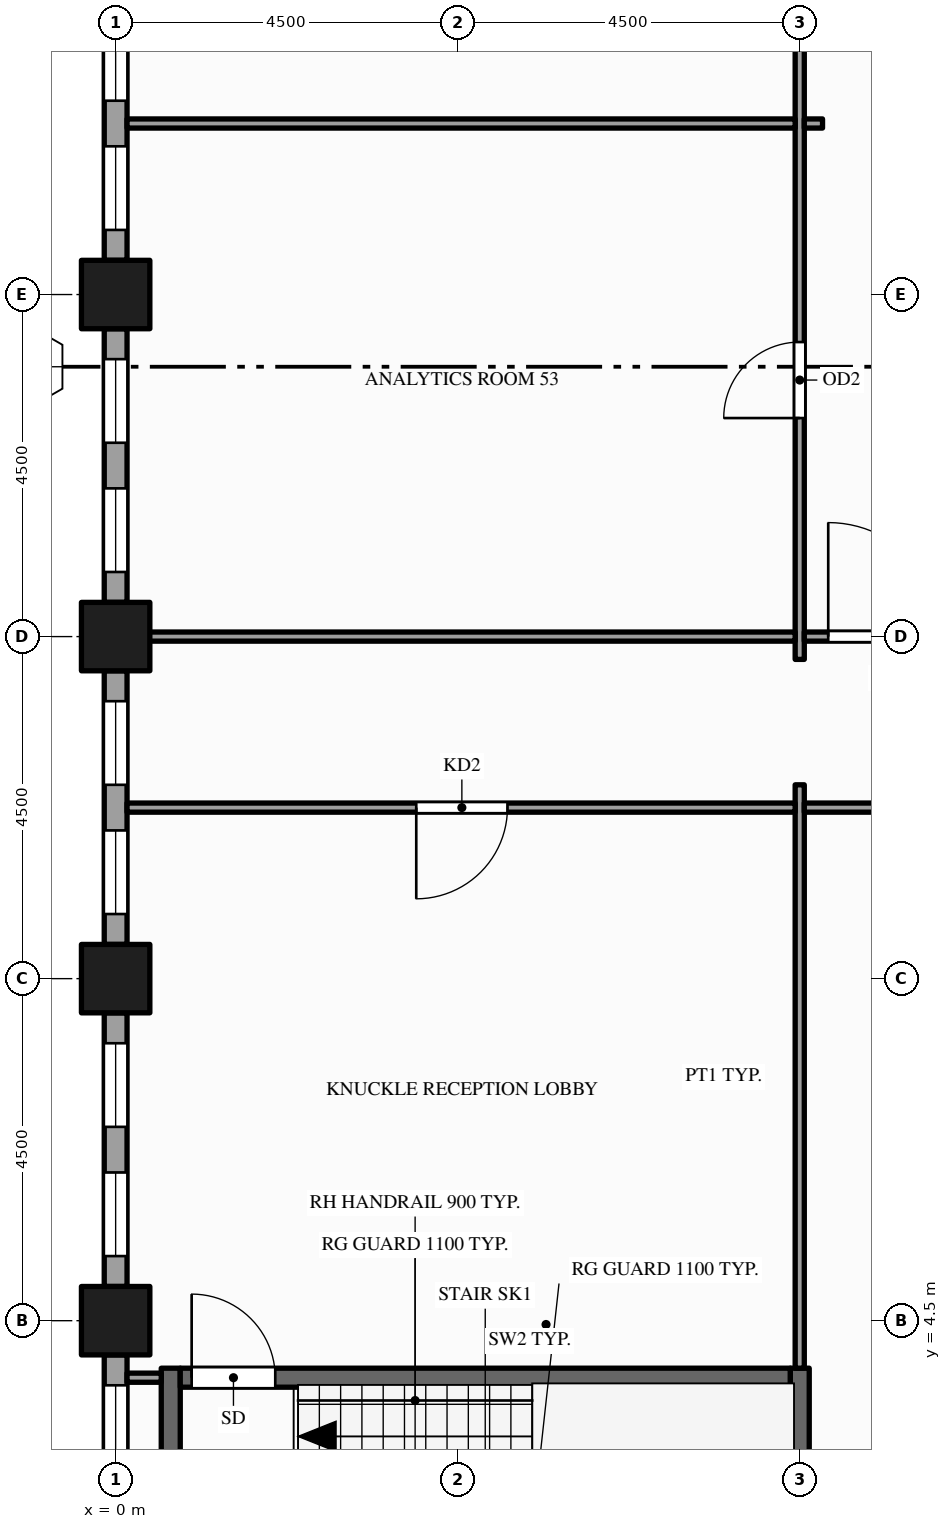
"""IFC4 building model, lengths in metres.
Left out: names, types, materials, properties, quantities, classifications, styles, units other than length and angle.
Written with IfcOpenShell. Run it as: python <this file> out.ifc"""

import sys

from ifc_helpers import new_model, si_unit, direction, frame, frame_2d, origin, origin_2d, place, context, subcontext, project, spatial, rectangle, hollow_rectangle, extrude, element, fill, save


model = new_model("IFC4")
c1 = context("Model", 3, precision=1e-05, world=origin(), true_north=direction((0.0, 1.0)))
c2 = subcontext(c1, "Body", "Model", "MODEL_VIEW")
j1 = project(units=[si_unit("LENGTHUNIT", "METRE"), si_unit("PLANEANGLEUNIT", "RADIAN")], contexts=[c1])
p1 = place(None, origin())
s1 = spatial("IfcSite", under=j1, at=p1, CompositionType="ELEMENT")
p2 = place(p1, origin())
s2 = spatial("IfcBuilding", under=s1, at=p2, CompositionType="ELEMENT")
p3 = place(p2, frame((0.0, 0.0, 155.0)))
s3 = spatial("IfcBuildingStorey", under=s2, at=p3, CompositionType="ELEMENT", Elevation=155.0)
for number, where, z_axis, x_axis in (
    (1, (0.0, 4.5, -0.15), (0.0, 0.0, 1.0), (1.0, 0.0, 0.0)),
    (2, (0.0, 9.0, -0.15), (0.0, 0.0, 1.0), (1.0, 0.0, 0.0)),
    (3, (0.0, 13.5, -0.15), (0.0, 0.0, 1.0), (1.0, 0.0, 0.0)),
    (4, (0.0, 18.0, -0.15), (0.0, 0.0, 1.0), (1.0, 0.0, 0.0)),
):
    element("IfcColumn", number, at=place(p3, frame(where, z_axis=z_axis, x_axis=x_axis)), inside=s3, PredefinedType="COLUMN", context=c2, shape_type="SweptSolid", body=[
        extrude(hollow_rectangle(XDim=0.9, YDim=0.9, WallThickness=0.045, at=origin_2d()), origin(), (0.0, 0.0, 1.0), 4.0),
    ])
p4 = place(p3, frame((0.0, 22.05, 0.0), z_axis=(0.0, 0.0, 1.0), x_axis=(0.0, -1.0, 0.0)))
e5 = element("IfcWall", 5, at=p4, inside=s3, PredefinedType="STANDARD", context=c2, shape_type="SweptSolid", body=[
    extrude(rectangle(XDim=3.6, YDim=0.3, at=frame_2d((1.8, 0.0))), origin(), (0.0, 0.0, 1.0), 3.149),
])
p5 = place(p4, frame((0.4, 0.0, 0.9)))
e6 = element("IfcOpeningElement", 6, at=p5, cuts=e5, PredefinedType="OPENING", context=c2, shape_type="SweptSolid", body=[
    extrude(rectangle(XDim=1.1, YDim=2.0, at=frame_2d((0.55, 1.0))), frame((0.0, 0.16, 0.0), z_axis=(0.0, -1.0, 0.0), x_axis=(1.0, 0.0, 0.0)), (0.0, 0.0, 1.0), 0.32),
])
p6 = place(p4, frame((2.1, 0.0, 0.9)))
e7 = element("IfcOpeningElement", 7, at=p6, cuts=e5, PredefinedType="OPENING", context=c2, shape_type="SweptSolid", body=[
    extrude(rectangle(XDim=1.1, YDim=2.0, at=frame_2d((0.55, 1.0))), frame((0.0, 0.16, 0.0), z_axis=(0.0, -1.0, 0.0), x_axis=(1.0, 0.0, 0.0)), (0.0, 0.0, 1.0), 0.32),
])
p7 = place(p3, frame((0.0, 17.55, 0.0), z_axis=(0.0, 0.0, 1.0), x_axis=(0.0, -1.0, 0.0)))
e8 = element("IfcWall", 8, at=p7, inside=s3, PredefinedType="STANDARD", context=c2, shape_type="SweptSolid", body=[
    extrude(rectangle(XDim=3.6, YDim=0.3, at=frame_2d((1.8, 0.0))), origin(), (0.0, 0.0, 1.0), 3.149),
])
p8 = place(p7, frame((0.4, 0.0, 0.9)))
e9 = element("IfcOpeningElement", 9, at=p8, cuts=e8, PredefinedType="OPENING", context=c2, shape_type="SweptSolid", body=[
    extrude(rectangle(XDim=1.1, YDim=2.0, at=frame_2d((0.55, 1.0))), frame((0.0, 0.16, 0.0), z_axis=(0.0, -1.0, 0.0), x_axis=(1.0, 0.0, 0.0)), (0.0, 0.0, 1.0), 0.32),
])
p9 = place(p7, frame((2.1, 0.0, 0.9)))
e10 = element("IfcOpeningElement", 10, at=p9, cuts=e8, PredefinedType="OPENING", context=c2, shape_type="SweptSolid", body=[
    extrude(rectangle(XDim=1.1, YDim=2.0, at=frame_2d((0.55, 1.0))), frame((0.0, 0.16, 0.0), z_axis=(0.0, -1.0, 0.0), x_axis=(1.0, 0.0, 0.0)), (0.0, 0.0, 1.0), 0.32),
])
p10 = place(p3, frame((0.0, 13.05, 0.0), z_axis=(0.0, 0.0, 1.0), x_axis=(0.0, -1.0, 0.0)))
e11 = element("IfcWall", 11, at=p10, inside=s3, PredefinedType="STANDARD", context=c2, shape_type="SweptSolid", body=[
    extrude(rectangle(XDim=3.6, YDim=0.3, at=frame_2d((1.8, 0.0))), origin(), (0.0, 0.0, 1.0), 3.149),
])
p11 = place(p10, frame((0.4, 0.0, 0.9)))
e12 = element("IfcOpeningElement", 12, at=p11, cuts=e11, PredefinedType="OPENING", context=c2, shape_type="SweptSolid", body=[
    extrude(rectangle(XDim=1.1, YDim=2.0, at=frame_2d((0.55, 1.0))), frame((0.0, 0.16, 0.0), z_axis=(0.0, -1.0, 0.0), x_axis=(1.0, 0.0, 0.0)), (0.0, 0.0, 1.0), 0.32),
])
p12 = place(p10, frame((2.1, 0.0, 0.9)))
e13 = element("IfcOpeningElement", 13, at=p12, cuts=e11, PredefinedType="OPENING", context=c2, shape_type="SweptSolid", body=[
    extrude(rectangle(XDim=1.1, YDim=2.0, at=frame_2d((0.55, 1.0))), frame((0.0, 0.16, 0.0), z_axis=(0.0, -1.0, 0.0), x_axis=(1.0, 0.0, 0.0)), (0.0, 0.0, 1.0), 0.32),
])
p13 = place(p3, frame((0.0, 8.55, 0.0), z_axis=(0.0, 0.0, 1.0), x_axis=(0.0, -1.0, 0.0)))
e14 = element("IfcWall", 14, at=p13, inside=s3, PredefinedType="STANDARD", context=c2, shape_type="SweptSolid", body=[
    extrude(rectangle(XDim=3.6, YDim=0.3, at=frame_2d((1.8, 0.0))), origin(), (0.0, 0.0, 1.0), 3.149),
])
p14 = place(p13, frame((0.4, 0.0, 0.9)))
e15 = element("IfcOpeningElement", 15, at=p14, cuts=e14, PredefinedType="OPENING", context=c2, shape_type="SweptSolid", body=[
    extrude(rectangle(XDim=1.1, YDim=2.0, at=frame_2d((0.55, 1.0))), frame((0.0, 0.16, 0.0), z_axis=(0.0, -1.0, 0.0), x_axis=(1.0, 0.0, 0.0)), (0.0, 0.0, 1.0), 0.32),
])
p15 = place(p13, frame((2.1, 0.0, 0.9)))
e16 = element("IfcOpeningElement", 16, at=p15, cuts=e14, PredefinedType="OPENING", context=c2, shape_type="SweptSolid", body=[
    extrude(rectangle(XDim=1.1, YDim=2.0, at=frame_2d((0.55, 1.0))), frame((0.0, 0.16, 0.0), z_axis=(0.0, -1.0, 0.0), x_axis=(1.0, 0.0, 0.0)), (0.0, 0.0, 1.0), 0.32),
])
p16 = place(p3, frame((0.0, 4.05, 0.0), z_axis=(0.0, 0.0, 1.0), x_axis=(0.0, -1.0, 0.0)))
e17 = element("IfcWall", 17, at=p16, inside=s3, PredefinedType="STANDARD", context=c2, shape_type="SweptSolid", body=[
    extrude(rectangle(XDim=3.6, YDim=0.3, at=frame_2d((1.8, 0.0))), origin(), (0.0, 0.0, 1.0), 3.149),
])
p17 = place(p16, frame((0.4, 0.0, 0.9)))
e18 = element("IfcOpeningElement", 18, at=p17, cuts=e17, PredefinedType="OPENING", context=c2, shape_type="SweptSolid", body=[
    extrude(rectangle(XDim=1.1, YDim=2.0, at=frame_2d((0.55, 1.0))), frame((0.0, 0.16, 0.0), z_axis=(0.0, -1.0, 0.0), x_axis=(1.0, 0.0, 0.0)), (0.0, 0.0, 1.0), 0.32),
])
p18 = place(p16, frame((2.1, 0.0, 0.9)))
e19 = element("IfcOpeningElement", 19, at=p18, cuts=e17, PredefinedType="OPENING", context=c2, shape_type="SweptSolid", body=[
    extrude(rectangle(XDim=1.1, YDim=2.0, at=frame_2d((0.55, 1.0))), frame((0.0, 0.16, 0.0), z_axis=(0.0, -1.0, 0.0), x_axis=(1.0, 0.0, 0.0)), (0.0, 0.0, 1.0), 0.32),
])
p19 = place(p3, frame((0.725, 0.6, 0.0), z_axis=(0.0, 0.0, 1.0), x_axis=(0.0, 1.0, 0.0)))
e20 = element("IfcWall", 20, at=p19, inside=s3, PredefinedType="SHEAR", context=c2, shape_type="SweptSolid", body=[
    extrude(rectangle(XDim=3.275, YDim=0.25, at=frame_2d((1.637, 0.0))), origin(), (0.0, 0.0, 1.0), 3.85),
])
p20 = place(p3, frame((9.0, 0.45, 0.0), z_axis=(0.0, 0.0, 1.0), x_axis=(0.0, 1.0, 0.0)))
e21 = element("IfcWall", 21, at=p20, inside=s3, PredefinedType="SHEAR", context=c2, shape_type="SweptSolid", body=[
    extrude(rectangle(XDim=3.425, YDim=0.25, at=frame_2d((1.712, 0.0))), origin(), (0.0, 0.0, 1.0), 3.85),
])
p21 = place(p3, frame((9.0, 3.875, 0.0), z_axis=(0.0, 0.0, 1.0), x_axis=(0.0, 1.0, 0.0)))
e22 = element("IfcWall", 22, at=p21, inside=s3, PredefinedType="PARTITIONING", context=c2, shape_type="SweptSolid", body=[
    extrude(rectangle(XDim=7.675, YDim=0.12, at=frame_2d((3.837, 0.0))), origin(), (0.0, 0.0, 1.0), 2.87),
])
p22 = place(p3, frame((9.0, 13.2, 0.0), z_axis=(0.0, 0.0, 1.0), x_axis=(0.0, 1.0, 0.0)))
e23 = element("IfcWall", 23, at=p22, inside=s3, PredefinedType="PARTITIONING", context=c2, shape_type="SweptSolid", body=[
    extrude(rectangle(XDim=18.6, YDim=0.12, at=frame_2d((9.3, 0.0))), origin(), (0.0, 0.0, 1.0), 2.6),
])
p23 = place(p22, frame((3.175, 0.0, 0.0)))
e24 = element("IfcOpeningElement", 24, at=p23, cuts=e23, PredefinedType="OPENING", context=c2, shape_type="SweptSolid", body=[
    extrude(rectangle(XDim=1.0, YDim=2.1, at=frame_2d((0.5, 1.05))), frame((0.0, 0.07, 0.0), z_axis=(0.0, -1.0, 0.0), x_axis=(1.0, 0.0, 0.0)), (0.0, 0.0, 1.0), 0.14),
])
p24 = place(p22, frame((9.955, 0.0, 0.0)))
e25 = element("IfcOpeningElement", 25, at=p24, cuts=e23, PredefinedType="OPENING", context=c2, shape_type="SweptSolid", body=[
    extrude(rectangle(XDim=1.0, YDim=2.1, at=frame_2d((0.5, 1.05))), frame((0.0, 0.07, 0.0), z_axis=(0.0, -1.0, 0.0), x_axis=(1.0, 0.0, 0.0)), (0.0, 0.0, 1.0), 0.14),
])
p25 = place(p3, frame((0.15, 3.75, 0.0), z_axis=(0.0, 0.0, 1.0), x_axis=(1.0, 0.0, 0.0)))
e26 = element("IfcWall", 26, at=p25, inside=s3, PredefinedType="PARTITIONING", context=c2, shape_type="SweptSolid", body=[
    extrude(rectangle(XDim=0.45, YDim=0.12, at=frame_2d((0.225, 0.0))), origin(), (0.0, 0.0, 1.0), 3.85),
])
p26 = place(p3, frame((0.85, 3.75, 0.0), z_axis=(0.0, 0.0, 1.0), x_axis=(1.0, 0.0, 0.0)))
e27 = element("IfcWall", 27, at=p26, inside=s3, PredefinedType="SHEAR", context=c2, shape_type="SweptSolid", body=[
    extrude(rectangle(XDim=8.025, YDim=0.25, at=frame_2d((4.012, 0.0))), origin(), (0.0, 0.0, 1.0), 3.85),
])
p27 = place(p26, frame((0.15, 0.0, 0.0)))
e28 = element("IfcOpeningElement", 28, at=p27, cuts=e27, PredefinedType="OPENING", context=c2, shape_type="SweptSolid", body=[
    extrude(rectangle(XDim=1.1, YDim=2.1, at=frame_2d((0.55, 1.05))), frame((0.0, 0.135, 0.0), z_axis=(0.0, -1.0, 0.0), x_axis=(1.0, 0.0, 0.0)), (0.0, 0.0, 1.0), 0.27),
])
p28 = place(p3, frame((0.15, 11.25, 0.0), z_axis=(0.0, 0.0, 1.0), x_axis=(1.0, 0.0, 0.0)))
e29 = element("IfcWall", 29, at=p28, inside=s3, PredefinedType="PARTITIONING", context=c2, shape_type="SweptSolid", body=[
    extrude(rectangle(XDim=8.79, YDim=0.12, at=frame_2d((4.395, 0.0))), origin(), (0.0, 0.0, 1.0), 2.87),
])
p29 = place(p28, frame((3.805, 0.0, 0.0)))
e30 = element("IfcOpeningElement", 30, at=p29, cuts=e29, PredefinedType="OPENING", context=c2, shape_type="SweptSolid", body=[
    extrude(rectangle(XDim=1.2, YDim=2.1, at=frame_2d((0.6, 1.05))), frame((0.0, 0.07, 0.0), z_axis=(0.0, -1.0, 0.0), x_axis=(1.0, 0.0, 0.0)), (0.0, 0.0, 1.0), 0.14),
])
p30 = place(p3, frame((9.06, 11.25, 0.0), z_axis=(0.0, 0.0, 1.0), x_axis=(1.0, 0.0, 0.0)))
e31 = element("IfcWall", 31, at=p30, inside=s3, PredefinedType="PARTITIONING", context=c2, shape_type="SweptSolid", body=[
    extrude(rectangle(XDim=8.88, YDim=0.12, at=frame_2d((4.44, 0.0))), origin(), (0.0, 0.0, 1.0), 2.87),
])
p31 = place(p30, frame((3.54, 0.0, 0.0)))
e32 = element("IfcOpeningElement", 32, at=p31, cuts=e31, PredefinedType="OPENING", context=c2, shape_type="SweptSolid", body=[
    extrude(rectangle(XDim=1.8, YDim=2.1, at=frame_2d((0.9, 1.05))), frame((0.0, 0.07, 0.0), z_axis=(0.0, -1.0, 0.0), x_axis=(1.0, 0.0, 0.0)), (0.0, 0.0, 1.0), 0.14),
])
p32 = place(p3, frame((0.15, 13.5, 0.0), z_axis=(0.0, 0.0, 1.0), x_axis=(1.0, 0.0, 0.0)))
e33 = element("IfcWall", 33, at=p32, inside=s3, PredefinedType="PARTITIONING", context=c2, shape_type="SweptSolid", body=[
    extrude(rectangle(XDim=8.79, YDim=0.12, at=frame_2d((4.395, 0.0))), origin(), (0.0, 0.0, 1.0), 2.87),
])
p33 = place(p3, frame((9.06, 13.5, 0.0), z_axis=(0.0, 0.0, 1.0), x_axis=(1.0, 0.0, 0.0)))
e34 = element("IfcWall", 34, at=p33, inside=s3, PredefinedType="PARTITIONING", context=c2, shape_type="SweptSolid", body=[
    extrude(rectangle(XDim=2.13, YDim=0.12, at=frame_2d((1.065, 0.0))), origin(), (0.0, 0.0, 1.0), 2.87),
])
p34 = place(p33, frame((0.315, 0.0, 0.0)))
e35 = element("IfcOpeningElement", 35, at=p34, cuts=e34, PredefinedType="OPENING", context=c2, shape_type="SweptSolid", body=[
    extrude(rectangle(XDim=1.5, YDim=2.1, at=frame_2d((0.75, 1.05))), frame((0.0, 0.07, 0.0), z_axis=(0.0, -1.0, 0.0), x_axis=(1.0, 0.0, 0.0)), (0.0, 0.0, 1.0), 0.14),
])
p35 = place(p3, frame((0.15, 20.25, 0.0), z_axis=(0.0, 0.0, 1.0), x_axis=(1.0, 0.0, 0.0)))
e36 = element("IfcWall", 36, at=p35, inside=s3, PredefinedType="PARTITIONING", context=c2, shape_type="SweptSolid", body=[
    extrude(rectangle(XDim=8.79, YDim=0.12, at=frame_2d((4.395, 0.0))), origin(), (0.0, 0.0, 1.0), 2.87),
])
p36 = place(p3, frame((9.06, 20.25, 0.0), z_axis=(0.0, 0.0, 1.0), x_axis=(1.0, 0.0, 0.0)))
e37 = element("IfcWall", 37, at=p36, inside=s3, PredefinedType="PARTITIONING", context=c2, shape_type="SweptSolid", body=[
    extrude(rectangle(XDim=0.24, YDim=0.12, at=frame_2d((0.12, 0.0))), origin(), (0.0, 0.0, 1.0), 2.87),
])
p37 = place(p5, origin())
e38 = element("IfcWindow", 38, at=p37, inside=s3, PartitioningType="SINGLE_PANEL", PredefinedType="WINDOW", context=c2, shape_type="SweptSolid", body=[
    extrude(rectangle(XDim=1.1, YDim=2.0, at=frame_2d((0.55, 1.0))), frame((0.0, 0.03, 0.0), z_axis=(0.0, -1.0, 0.0), x_axis=(1.0, 0.0, 0.0)), (0.0, 0.0, 1.0), 0.06),
])
fill(e6, e38)
p38 = place(p6, origin())
e39 = element("IfcWindow", 39, at=p38, inside=s3, PartitioningType="SINGLE_PANEL", PredefinedType="WINDOW", context=c2, shape_type="SweptSolid", body=[
    extrude(rectangle(XDim=1.1, YDim=2.0, at=frame_2d((0.55, 1.0))), frame((0.0, 0.03, 0.0), z_axis=(0.0, -1.0, 0.0), x_axis=(1.0, 0.0, 0.0)), (0.0, 0.0, 1.0), 0.06),
])
fill(e7, e39)
p39 = place(p8, origin())
e40 = element("IfcWindow", 40, at=p39, inside=s3, PartitioningType="SINGLE_PANEL", PredefinedType="WINDOW", context=c2, shape_type="SweptSolid", body=[
    extrude(rectangle(XDim=1.1, YDim=2.0, at=frame_2d((0.55, 1.0))), frame((0.0, 0.03, 0.0), z_axis=(0.0, -1.0, 0.0), x_axis=(1.0, 0.0, 0.0)), (0.0, 0.0, 1.0), 0.06),
])
fill(e9, e40)
p40 = place(p9, origin())
e41 = element("IfcWindow", 41, at=p40, inside=s3, PartitioningType="SINGLE_PANEL", PredefinedType="WINDOW", context=c2, shape_type="SweptSolid", body=[
    extrude(rectangle(XDim=1.1, YDim=2.0, at=frame_2d((0.55, 1.0))), frame((0.0, 0.03, 0.0), z_axis=(0.0, -1.0, 0.0), x_axis=(1.0, 0.0, 0.0)), (0.0, 0.0, 1.0), 0.06),
])
fill(e10, e41)
p41 = place(p11, origin())
e42 = element("IfcWindow", 42, at=p41, inside=s3, PartitioningType="SINGLE_PANEL", PredefinedType="WINDOW", context=c2, shape_type="SweptSolid", body=[
    extrude(rectangle(XDim=1.1, YDim=2.0, at=frame_2d((0.55, 1.0))), frame((0.0, 0.03, 0.0), z_axis=(0.0, -1.0, 0.0), x_axis=(1.0, 0.0, 0.0)), (0.0, 0.0, 1.0), 0.06),
])
fill(e12, e42)
p42 = place(p12, origin())
e43 = element("IfcWindow", 43, at=p42, inside=s3, PartitioningType="SINGLE_PANEL", PredefinedType="WINDOW", context=c2, shape_type="SweptSolid", body=[
    extrude(rectangle(XDim=1.1, YDim=2.0, at=frame_2d((0.55, 1.0))), frame((0.0, 0.03, 0.0), z_axis=(0.0, -1.0, 0.0), x_axis=(1.0, 0.0, 0.0)), (0.0, 0.0, 1.0), 0.06),
])
fill(e13, e43)
p43 = place(p14, origin())
e44 = element("IfcWindow", 44, at=p43, inside=s3, PartitioningType="SINGLE_PANEL", PredefinedType="WINDOW", context=c2, shape_type="SweptSolid", body=[
    extrude(rectangle(XDim=1.1, YDim=2.0, at=frame_2d((0.55, 1.0))), frame((0.0, 0.03, 0.0), z_axis=(0.0, -1.0, 0.0), x_axis=(1.0, 0.0, 0.0)), (0.0, 0.0, 1.0), 0.06),
])
fill(e15, e44)
p44 = place(p15, origin())
e45 = element("IfcWindow", 45, at=p44, inside=s3, PartitioningType="SINGLE_PANEL", PredefinedType="WINDOW", context=c2, shape_type="SweptSolid", body=[
    extrude(rectangle(XDim=1.1, YDim=2.0, at=frame_2d((0.55, 1.0))), frame((0.0, 0.03, 0.0), z_axis=(0.0, -1.0, 0.0), x_axis=(1.0, 0.0, 0.0)), (0.0, 0.0, 1.0), 0.06),
])
fill(e16, e45)
p45 = place(p17, origin())
e46 = element("IfcWindow", 46, at=p45, inside=s3, PartitioningType="SINGLE_PANEL", PredefinedType="WINDOW", context=c2, shape_type="SweptSolid", body=[
    extrude(rectangle(XDim=1.1, YDim=2.0, at=frame_2d((0.55, 1.0))), frame((0.0, 0.03, 0.0), z_axis=(0.0, -1.0, 0.0), x_axis=(1.0, 0.0, 0.0)), (0.0, 0.0, 1.0), 0.06),
])
fill(e18, e46)
p46 = place(p27, origin())
e47 = element("IfcDoor", 47, at=p46, inside=s3, OperationType="SINGLE_SWING_LEFT", PredefinedType="DOOR", context=c2, shape_type="SweptSolid", body=[
    extrude(rectangle(XDim=1.1, YDim=2.1, at=frame_2d((0.55, 1.05))), frame((0.0, 0.025, 0.0), z_axis=(0.0, -1.0, 0.0), x_axis=(1.0, 0.0, 0.0)), (0.0, 0.0, 1.0), 0.05),
])
fill(e28, e47)
p47 = place(p29, origin())
e48 = element("IfcDoor", 48, at=p47, inside=s3, OperationType="SINGLE_SWING_LEFT", PredefinedType="DOOR", context=c2, shape_type="SweptSolid", body=[
    extrude(rectangle(XDim=1.2, YDim=2.1, at=frame_2d((0.6, 1.05))), frame((0.0, 0.025, 0.0), z_axis=(0.0, -1.0, 0.0), x_axis=(1.0, 0.0, 0.0)), (0.0, 0.0, 1.0), 0.05),
])
fill(e30, e48)
p48 = place(p34, origin())
e49 = element("IfcDoor", 49, at=p48, inside=s3, OperationType="SINGLE_SWING_LEFT", PredefinedType="DOOR", context=c2, shape_type="SweptSolid", body=[
    extrude(rectangle(XDim=1.5, YDim=2.1, at=frame_2d((0.75, 1.05))), frame((0.0, 0.025, 0.0), z_axis=(0.0, -1.0, 0.0), x_axis=(1.0, 0.0, 0.0)), (0.0, 0.0, 1.0), 0.05),
])
fill(e35, e49)
p49 = place(p23, origin())
e50 = element("IfcDoor", 50, at=p49, inside=s3, OperationType="SINGLE_SWING_LEFT", PredefinedType="DOOR", context=c2, shape_type="SweptSolid", body=[
    extrude(rectangle(XDim=1.0, YDim=2.1, at=frame_2d((0.5, 1.05))), frame((0.0, 0.025, 0.0), z_axis=(0.0, -1.0, 0.0), x_axis=(1.0, 0.0, 0.0)), (0.0, 0.0, 1.0), 0.05),
])
fill(e24, e50)
save(model, sys.argv[1])
